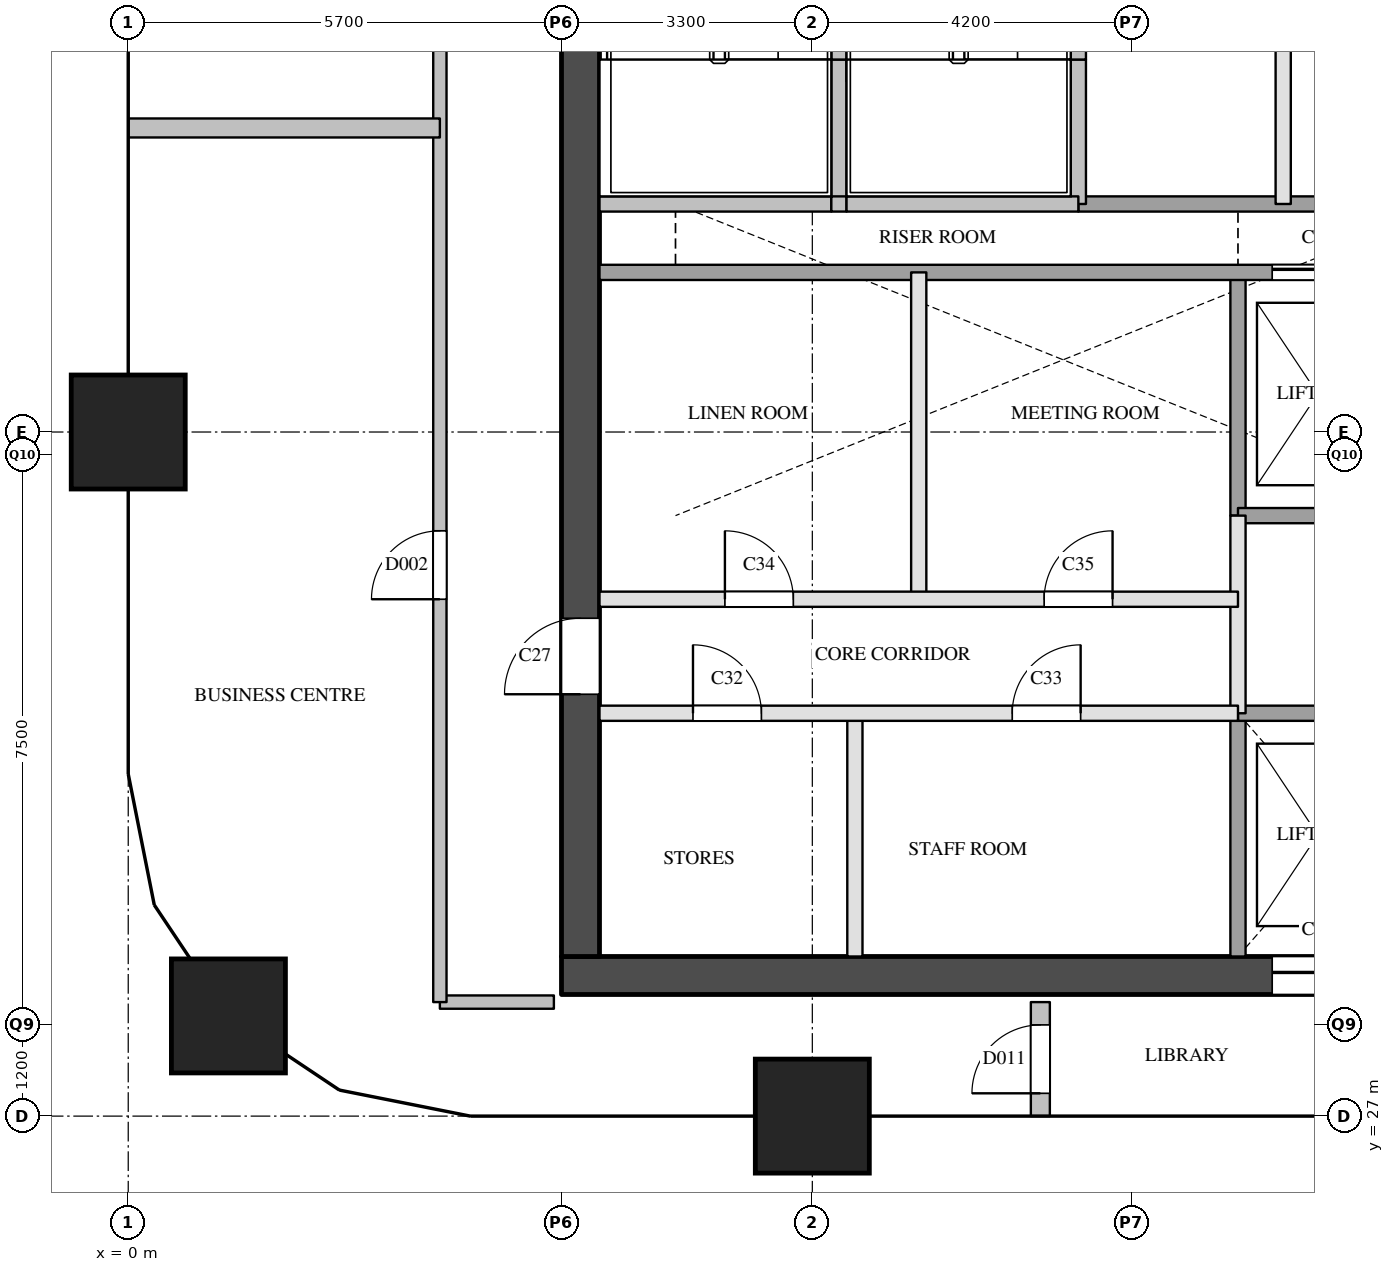
"""IFC4 building model, lengths in metres.
Left out: names, types, materials, properties, quantities, classifications, styles, units other than length and angle.
Written with IfcOpenShell. Run it as: python <this file> out.ifc"""

import sys

from ifc_helpers import new_model, si_unit, direction, frame, frame_2d, origin, origin_2d, place, context, subcontext, project, spatial, rectangle, extrude, element, fill, save


model = new_model("IFC4")
c1 = context("Model", 3, precision=1e-05, world=origin(), true_north=direction((0.0, 1.0)))
c2 = subcontext(c1, "Body", "Model", "MODEL_VIEW")
j1 = project(units=[si_unit("LENGTHUNIT", "METRE"), si_unit("PLANEANGLEUNIT", "RADIAN")], contexts=[c1])
p1 = place(None, origin())
s1 = spatial("IfcSite", under=j1, at=p1, CompositionType="ELEMENT")
p2 = place(p1, origin())
s2 = spatial("IfcBuilding", under=s1, at=p2, CompositionType="ELEMENT")
p3 = place(p2, frame((0.0, 0.0, 138.8)))
s3 = spatial("IfcBuildingStorey", under=s2, at=p3, CompositionType="ELEMENT", Elevation=138.8)
for number, where, z_axis, x_axis in (
    (1, (1.318, 28.318, 0.0), (0.0, 0.0, 1.0), (1.0, 0.0, 0.0)),
    (2, (0.0, 36.0, 0.0), (0.0, 0.0, 1.0), (1.0, 0.0, 0.0)),
    (3, (9.0, 27.0, 0.0), (0.0, 0.0, 1.0), (1.0, 0.0, 0.0)),
):
    element("IfcColumn", number, at=place(p3, frame(where, z_axis=z_axis, x_axis=x_axis)), inside=s3, PredefinedType="COLUMN", context=c2, shape_type="SweptSolid", body=[
        extrude(rectangle(XDim=1.5, YDim=1.5, at=origin_2d()), origin(), (0.0, 0.0, 1.0), 3.9),
    ])
p4 = place(p3, frame((5.7, 28.85, 0.0), z_axis=(0.0, 0.0, 1.0), x_axis=(1.0, 0.0, 0.0)))
e4 = element("IfcWall", 4, at=p4, inside=s3, PredefinedType="SHEAR", context=c2, shape_type="SweptSolid", body=[
    extrude(rectangle(XDim=12.2, YDim=0.5, at=frame_2d((6.1, 0.0))), origin(), (0.0, 0.0, 1.0), 3.6),
])
p5 = place(p4, frame((9.35, 0.0, 0.0)))
e5 = element("IfcOpeningElement", 5, at=p5, cuts=e4, PredefinedType="OPENING", context=c2, shape_type="SweptSolid", body=[
    extrude(rectangle(XDim=1.2, YDim=2.1, at=frame_2d((0.6, 1.05))), frame((0.0, 0.26, 0.0), z_axis=(0.0, -1.0, 0.0), x_axis=(1.0, 0.0, 0.0)), (0.0, 0.0, 1.0), 0.52),
])
p6 = place(p3, frame((5.95, 29.1, 0.0), z_axis=(0.0, 0.0, 1.0), x_axis=(0.0, 1.0, 0.0)))
e6 = element("IfcWall", 6, at=p6, inside=s3, PredefinedType="SHEAR", context=c2, shape_type="SweptSolid", body=[
    extrude(rectangle(XDim=20.3, YDim=0.5, at=frame_2d((10.15, 0.0))), origin(), (0.0, 0.0, 1.0), 3.6),
])
p7 = place(p6, frame((3.45, 0.0, 0.0)))
e7 = element("IfcOpeningElement", 7, at=p7, cuts=e6, PredefinedType="OPENING", context=c2, shape_type="SweptSolid", body=[
    extrude(rectangle(XDim=1.0, YDim=2.1, at=frame_2d((0.5, 1.05))), frame((0.0, 0.26, 0.0), z_axis=(0.0, -1.0, 0.0), x_axis=(1.0, 0.0, 0.0)), (0.0, 0.0, 1.0), 0.52),
])
p8 = place(p6, frame((16.4, 0.0, 0.0)))
e8 = element("IfcOpeningElement", 8, at=p8, cuts=e6, PredefinedType="OPENING", context=c2, shape_type="SweptSolid", body=[
    extrude(rectangle(XDim=1.0, YDim=2.1, at=frame_2d((0.5, 1.05))), frame((0.0, 0.26, 0.0), z_axis=(0.0, -1.0, 0.0), x_axis=(1.0, 0.0, 0.0)), (0.0, 0.0, 1.0), 0.52),
])
p9 = place(p3, frame((9.35, 39.0, 0.0), z_axis=(0.0, 0.0, 1.0), x_axis=(0.0, 1.0, 0.0)))
e9 = element("IfcWall", 9, at=p9, inside=s3, PredefinedType="SOLIDWALL", context=c2, shape_type="SweptSolid", body=[
    extrude(rectangle(XDim=1.9, YDim=0.2, at=frame_2d((0.95, 0.0))), origin(), (0.0, 0.0, 1.0), 3.6),
])
p10 = place(p3, frame((9.35, 40.9, 0.0), z_axis=(0.0, 0.0, 1.0), x_axis=(0.0, 1.0, 0.0)))
e10 = element("IfcWall", 10, at=p10, inside=s3, PredefinedType="SOLIDWALL", context=c2, shape_type="SweptSolid", body=[
    extrude(rectangle(XDim=4.3, YDim=0.2, at=frame_2d((2.15, 0.0))), origin(), (0.0, 0.0, 1.0), 3.6),
])
p11 = place(p3, frame((9.56, 29.1, 0.0), z_axis=(0.0, 0.0, 1.0), x_axis=(0.0, 1.0, 0.0)))
e11 = element("IfcWall", 11, at=p11, inside=s3, PredefinedType="PARTITIONING", context=c2, shape_type="SweptSolid", body=[
    extrude(rectangle(XDim=3.2, YDim=0.2, at=frame_2d((1.6, 0.0))), origin(), (0.0, 0.0, 1.0), 3.6),
])
p12 = place(p3, frame((10.4, 33.8, 0.0), z_axis=(0.0, 0.0, 1.0), x_axis=(0.0, 1.0, 0.0)))
e12 = element("IfcWall", 12, at=p12, inside=s3, PredefinedType="PARTITIONING", context=c2, shape_type="SweptSolid", body=[
    extrude(rectangle(XDim=4.3, YDim=0.2, at=frame_2d((2.15, 0.0))), origin(), (0.0, 0.0, 1.0), 3.6),
])
p13 = place(p3, frame((12.5, 39.0, 0.0), z_axis=(0.0, 0.0, 1.0), x_axis=(0.0, 1.0, 0.0)))
e13 = element("IfcWall", 13, at=p13, inside=s3, PredefinedType="SOLIDWALL", context=c2, shape_type="SweptSolid", body=[
    extrude(rectangle(XDim=1.9, YDim=0.2, at=frame_2d((0.95, 0.0))), origin(), (0.0, 0.0, 1.0), 3.6),
])
p14 = place(p3, frame((12.5, 40.9, 0.0), z_axis=(0.0, 0.0, 1.0), x_axis=(0.0, 1.0, 0.0)))
e14 = element("IfcWall", 14, at=p14, inside=s3, PredefinedType="SOLIDWALL", context=c2, shape_type="SweptSolid", body=[
    extrude(rectangle(XDim=4.3, YDim=0.2, at=frame_2d((2.15, 0.0))), origin(), (0.0, 0.0, 1.0), 3.6),
])
p15 = place(p3, frame((14.6, 32.3, 0.0), z_axis=(0.0, 0.0, 1.0), x_axis=(0.0, 1.0, 0.0)))
e15 = element("IfcWall", 15, at=p15, inside=s3, PredefinedType="PARTITIONING", context=c2, shape_type="SweptSolid", body=[
    extrude(rectangle(XDim=2.6, YDim=0.2, at=frame_2d((1.3, 0.0))), origin(), (0.0, 0.0, 1.0), 3.6),
])
p16 = place(p3, frame((14.6, 29.1, 0.0), z_axis=(0.0, 0.0, 1.0), x_axis=(0.0, 1.0, 0.0)))
e16 = element("IfcWall", 16, at=p16, inside=s3, PredefinedType="SOLIDWALL", context=c2, shape_type="SweptSolid", body=[
    extrude(rectangle(XDim=3.2, YDim=0.2, at=frame_2d((1.6, 0.0))), origin(), (0.0, 0.0, 1.0), 3.6),
])
p17 = place(p3, frame((14.6, 34.9, 0.0), z_axis=(0.0, 0.0, 1.0), x_axis=(0.0, 1.0, 0.0)))
e17 = element("IfcWall", 17, at=p17, inside=s3, PredefinedType="SOLIDWALL", context=c2, shape_type="SweptSolid", body=[
    extrude(rectangle(XDim=3.2, YDim=0.2, at=frame_2d((1.6, 0.0))), origin(), (0.0, 0.0, 1.0), 3.6),
])
p18 = place(p3, frame((15.195, 39.0, 0.0), z_axis=(0.0, 0.0, 1.0), x_axis=(0.0, 1.0, 0.0)))
e18 = element("IfcWall", 18, at=p18, inside=s3, PredefinedType="PARTITIONING", context=c2, shape_type="SweptSolid", body=[
    extrude(rectangle(XDim=6.2, YDim=0.2, at=frame_2d((3.1, 0.0))), origin(), (0.0, 0.0, 1.0), 3.6),
])
p19 = place(p3, frame((6.2, 32.3, 0.0), z_axis=(0.0, 0.0, 1.0), x_axis=(1.0, 0.0, 0.0)))
e19 = element("IfcWall", 19, at=p19, inside=s3, PredefinedType="PARTITIONING", context=c2, shape_type="SweptSolid", body=[
    extrude(rectangle(XDim=8.4, YDim=0.2, at=frame_2d((4.2, 0.0))), origin(), (0.0, 0.0, 1.0), 3.6),
])
p20 = place(p19, frame((1.23, 0.0, 0.0)))
e20 = element("IfcOpeningElement", 20, at=p20, cuts=e19, PredefinedType="OPENING", context=c2, shape_type="SweptSolid", body=[
    extrude(rectangle(XDim=0.9, YDim=2.1, at=frame_2d((0.45, 1.05))), frame((0.0, 0.11, 0.0), z_axis=(0.0, -1.0, 0.0), x_axis=(1.0, 0.0, 0.0)), (0.0, 0.0, 1.0), 0.22),
])
p21 = place(p19, frame((5.43, 0.0, 0.0)))
e21 = element("IfcOpeningElement", 21, at=p21, cuts=e19, PredefinedType="OPENING", context=c2, shape_type="SweptSolid", body=[
    extrude(rectangle(XDim=0.9, YDim=2.1, at=frame_2d((0.45, 1.05))), frame((0.0, 0.11, 0.0), z_axis=(0.0, -1.0, 0.0), x_axis=(1.0, 0.0, 0.0)), (0.0, 0.0, 1.0), 0.22),
])
p22 = place(p3, frame((14.6, 32.3, 0.0), z_axis=(0.0, 0.0, 1.0), x_axis=(1.0, 0.0, 0.0)))
e22 = element("IfcWall", 22, at=p22, inside=s3, PredefinedType="SOLIDWALL", context=c2, shape_type="SweptSolid", body=[
    extrude(rectangle(XDim=2.8, YDim=0.2, at=frame_2d((1.4, 0.0))), origin(), (0.0, 0.0, 1.0), 3.6),
])
p23 = place(p3, frame((6.2, 33.8, 0.0), z_axis=(0.0, 0.0, 1.0), x_axis=(1.0, 0.0, 0.0)))
e23 = element("IfcWall", 23, at=p23, inside=s3, PredefinedType="PARTITIONING", context=c2, shape_type="SweptSolid", body=[
    extrude(rectangle(XDim=8.4, YDim=0.2, at=frame_2d((4.2, 0.0))), origin(), (0.0, 0.0, 1.0), 3.6),
])
p24 = place(p23, frame((1.65, 0.0, 0.0)))
e24 = element("IfcOpeningElement", 24, at=p24, cuts=e23, PredefinedType="OPENING", context=c2, shape_type="SweptSolid", body=[
    extrude(rectangle(XDim=0.9, YDim=2.1, at=frame_2d((0.45, 1.05))), frame((0.0, 0.11, 0.0), z_axis=(0.0, -1.0, 0.0), x_axis=(1.0, 0.0, 0.0)), (0.0, 0.0, 1.0), 0.22),
])
p25 = place(p23, frame((5.85, 0.0, 0.0)))
e25 = element("IfcOpeningElement", 25, at=p25, cuts=e23, PredefinedType="OPENING", context=c2, shape_type="SweptSolid", body=[
    extrude(rectangle(XDim=0.9, YDim=2.1, at=frame_2d((0.45, 1.05))), frame((0.0, 0.11, 0.0), z_axis=(0.0, -1.0, 0.0), x_axis=(1.0, 0.0, 0.0)), (0.0, 0.0, 1.0), 0.22),
])
p26 = place(p3, frame((14.6, 34.9, 0.0), z_axis=(0.0, 0.0, 1.0), x_axis=(1.0, 0.0, 0.0)))
e26 = element("IfcWall", 26, at=p26, inside=s3, PredefinedType="SOLIDWALL", context=c2, shape_type="SweptSolid", body=[
    extrude(rectangle(XDim=2.8, YDim=0.2, at=frame_2d((1.4, 0.0))), origin(), (0.0, 0.0, 1.0), 3.6),
])
p27 = place(p3, frame((6.2, 38.1, 0.0), z_axis=(0.0, 0.0, 1.0), x_axis=(1.0, 0.0, 0.0)))
e27 = element("IfcWall", 27, at=p27, inside=s3, PredefinedType="SOLIDWALL", context=c2, shape_type="SweptSolid", body=[
    extrude(rectangle(XDim=11.2, YDim=0.2, at=frame_2d((5.6, 0.0))), origin(), (0.0, 0.0, 1.0), 3.6),
])
p28 = place(p27, frame((8.85, 0.0, 0.0)))
e28 = element("IfcOpeningElement", 28, at=p28, cuts=e27, PredefinedType="OPENING", context=c2, shape_type="SweptSolid", body=[
    extrude(rectangle(XDim=1.2, YDim=2.1, at=frame_2d((0.6, 1.05))), frame((0.0, 0.11, 0.0), z_axis=(0.0, -1.0, 0.0), x_axis=(1.0, 0.0, 0.0)), (0.0, 0.0, 1.0), 0.22),
])
p29 = place(p3, frame((12.5, 39.0, 0.0), z_axis=(0.0, 0.0, 1.0), x_axis=(1.0, 0.0, 0.0)))
e29 = element("IfcWall", 29, at=p29, inside=s3, PredefinedType="SOLIDWALL", context=c2, shape_type="SweptSolid", body=[
    extrude(rectangle(XDim=4.9, YDim=0.2, at=frame_2d((2.45, 0.0))), origin(), (0.0, 0.0, 1.0), 3.6),
])
p30 = place(p3, frame((6.2, 39.0, 0.0), z_axis=(0.0, 0.0, 1.0), x_axis=(1.0, 0.0, 0.0)))
e30 = element("IfcWall", 30, at=p30, inside=s3, PredefinedType="SOLIDWALL", context=c2, shape_type="SweptSolid", body=[
    extrude(rectangle(XDim=3.05, YDim=0.2, at=frame_2d((1.525, 0.0))), origin(), (0.0, 0.0, 1.0), 3.6),
])
p31 = place(p3, frame((9.25, 39.0, 0.0), z_axis=(0.0, 0.0, 1.0), x_axis=(1.0, 0.0, 0.0)))
e31 = element("IfcWall", 31, at=p31, inside=s3, PredefinedType="SOLIDWALL", context=c2, shape_type="SweptSolid", body=[
    extrude(rectangle(XDim=0.2, YDim=0.2, at=frame_2d((0.1, 0.0))), origin(), (0.0, 0.0, 1.0), 3.6),
])
p32 = place(p3, frame((9.45, 39.0, 0.0), z_axis=(0.0, 0.0, 1.0), x_axis=(1.0, 0.0, 0.0)))
e32 = element("IfcWall", 32, at=p32, inside=s3, PredefinedType="SOLIDWALL", context=c2, shape_type="SweptSolid", body=[
    extrude(rectangle(XDim=3.05, YDim=0.2, at=frame_2d((1.525, 0.0))), origin(), (0.0, 0.0, 1.0), 3.6),
])
p33 = place(p3, frame((4.1, 28.5, 0.0), z_axis=(0.0, 0.0, 1.0), x_axis=(1.0, 0.0, 0.0)))
e33 = element("IfcWall", 33, at=p33, inside=s3, PredefinedType="PARTITIONING", context=c2, shape_type="SweptSolid", body=[
    extrude(rectangle(XDim=1.5, YDim=0.175, at=frame_2d((0.75, 0.0))), origin(), (0.0, 0.0, 1.0), 3.6),
])
p34 = place(p3, frame((4.1, 28.5, 0.0), z_axis=(0.0, 0.0, 1.0), x_axis=(0.0, 1.0, 0.0)))
e34 = element("IfcWall", 34, at=p34, inside=s3, PredefinedType="PARTITIONING", context=c2, shape_type="SweptSolid", body=[
    extrude(rectangle(XDim=23.0, YDim=0.175, at=frame_2d((11.5, 0.0))), origin(), (0.0, 0.0, 1.0), 3.6),
])
p35 = place(p34, frame((5.3, 0.0, 0.0)))
e35 = element("IfcOpeningElement", 35, at=p35, cuts=e34, PredefinedType="OPENING", context=c2, shape_type="SweptSolid", body=[
    extrude(rectangle(XDim=0.9, YDim=2.1, at=frame_2d((0.45, 1.05))), frame((0.0, 0.097, 0.0), z_axis=(0.0, -1.0, 0.0), x_axis=(1.0, 0.0, 0.0)), (0.0, 0.0, 1.0), 0.195),
])
p36 = place(p34, frame((16.8, 0.0, 0.0)))
e36 = element("IfcOpeningElement", 36, at=p36, cuts=e34, PredefinedType="OPENING", context=c2, shape_type="SweptSolid", body=[
    extrude(rectangle(XDim=0.9, YDim=2.1, at=frame_2d((0.45, 1.05))), frame((0.0, 0.097, 0.0), z_axis=(0.0, -1.0, 0.0), x_axis=(1.0, 0.0, 0.0)), (0.0, 0.0, 1.0), 0.195),
])
p37 = place(p3, frame((0.0, 40.0, 0.0), z_axis=(0.0, 0.0, 1.0), x_axis=(1.0, 0.0, 0.0)))
e37 = element("IfcWall", 37, at=p37, inside=s3, PredefinedType="PARTITIONING", context=c2, shape_type="SweptSolid", body=[
    extrude(rectangle(XDim=4.1, YDim=0.25, at=frame_2d((2.05, 0.0))), origin(), (0.0, 0.0, 1.0), 2.6),
])
p38 = place(p3, frame((12.0, 27.0, 0.0), z_axis=(0.0, 0.0, 1.0), x_axis=(0.0, 1.0, 0.0)))
e38 = element("IfcWall", 38, at=p38, inside=s3, PredefinedType="PARTITIONING", context=c2, shape_type="SweptSolid", body=[
    extrude(rectangle(XDim=1.5, YDim=0.25, at=frame_2d((0.75, 0.0))), origin(), (0.0, 0.0, 1.0), 2.6),
])
p39 = place(p38, frame((0.3, 0.0, 0.0)))
e39 = element("IfcOpeningElement", 39, at=p39, cuts=e38, PredefinedType="OPENING", context=c2, shape_type="SweptSolid", body=[
    extrude(rectangle(XDim=0.9, YDim=2.1, at=frame_2d((0.45, 1.05))), frame((0.0, 0.135, 0.0), z_axis=(0.0, -1.0, 0.0), x_axis=(1.0, 0.0, 0.0)), (0.0, 0.0, 1.0), 0.27),
])
p40 = place(p5, origin())
e40 = element("IfcDoor", 40, at=p40, inside=s3, OperationType="SLIDING_TO_LEFT", PredefinedType="DOOR", context=c2, shape_type="SweptSolid", body=[
    extrude(rectangle(XDim=1.2, YDim=2.1, at=frame_2d((0.6, 1.05))), frame((0.0, 0.025, 0.0), z_axis=(0.0, -1.0, 0.0), x_axis=(1.0, 0.0, 0.0)), (0.0, 0.0, 1.0), 0.05),
])
fill(e5, e40)
p41 = place(p28, origin())
e41 = element("IfcDoor", 41, at=p41, inside=s3, OperationType="SLIDING_TO_LEFT", PredefinedType="DOOR", context=c2, shape_type="SweptSolid", body=[
    extrude(rectangle(XDim=1.2, YDim=2.1, at=frame_2d((0.6, 1.05))), frame((0.0, 0.025, 0.0), z_axis=(0.0, -1.0, 0.0), x_axis=(1.0, 0.0, 0.0)), (0.0, 0.0, 1.0), 0.05),
])
fill(e28, e41)
p42 = place(p7, origin())
e42 = element("IfcDoor", 42, at=p42, inside=s3, OperationType="SINGLE_SWING_LEFT", PredefinedType="DOOR", context=c2, shape_type="SweptSolid", body=[
    extrude(rectangle(XDim=1.0, YDim=2.1, at=frame_2d((0.5, 1.05))), frame((0.0, 0.025, 0.0), z_axis=(0.0, -1.0, 0.0), x_axis=(1.0, 0.0, 0.0)), (0.0, 0.0, 1.0), 0.05),
])
fill(e7, e42)
p43 = place(p20, origin())
e43 = element("IfcDoor", 43, at=p43, inside=s3, OperationType="SINGLE_SWING_LEFT", PredefinedType="DOOR", context=c2, shape_type="SweptSolid", body=[
    extrude(rectangle(XDim=0.9, YDim=2.1, at=frame_2d((0.45, 1.05))), frame((0.0, 0.025, 0.0), z_axis=(0.0, -1.0, 0.0), x_axis=(1.0, 0.0, 0.0)), (0.0, 0.0, 1.0), 0.05),
])
fill(e20, e43)
p44 = place(p21, origin())
e44 = element("IfcDoor", 44, at=p44, inside=s3, OperationType="SINGLE_SWING_RIGHT", PredefinedType="DOOR", context=c2, shape_type="SweptSolid", body=[
    extrude(rectangle(XDim=0.9, YDim=2.1, at=frame_2d((0.45, 1.05))), frame((0.0, 0.025, 0.0), z_axis=(0.0, -1.0, 0.0), x_axis=(1.0, 0.0, 0.0)), (0.0, 0.0, 1.0), 0.05),
])
fill(e21, e44)
p45 = place(p24, origin())
e45 = element("IfcDoor", 45, at=p45, inside=s3, OperationType="SINGLE_SWING_LEFT", PredefinedType="DOOR", context=c2, shape_type="SweptSolid", body=[
    extrude(rectangle(XDim=0.9, YDim=2.1, at=frame_2d((0.45, 1.05))), frame((0.0, 0.025, 0.0), z_axis=(0.0, -1.0, 0.0), x_axis=(1.0, 0.0, 0.0)), (0.0, 0.0, 1.0), 0.05),
])
fill(e24, e45)
p46 = place(p25, origin())
e46 = element("IfcDoor", 46, at=p46, inside=s3, OperationType="SINGLE_SWING_RIGHT", PredefinedType="DOOR", context=c2, shape_type="SweptSolid", body=[
    extrude(rectangle(XDim=0.9, YDim=2.1, at=frame_2d((0.45, 1.05))), frame((0.0, 0.025, 0.0), z_axis=(0.0, -1.0, 0.0), x_axis=(1.0, 0.0, 0.0)), (0.0, 0.0, 1.0), 0.05),
])
fill(e25, e46)
p47 = place(p35, origin())
e47 = element("IfcDoor", 47, at=p47, inside=s3, OperationType="SINGLE_SWING_LEFT", PredefinedType="DOOR", context=c2, shape_type="SweptSolid", body=[
    extrude(rectangle(XDim=0.9, YDim=2.1, at=frame_2d((0.45, 1.05))), frame((0.0, 0.025, 0.0), z_axis=(0.0, -1.0, 0.0), x_axis=(1.0, 0.0, 0.0)), (0.0, 0.0, 1.0), 0.05),
])
fill(e35, e47)
p48 = place(p39, origin())
e48 = element("IfcDoor", 48, at=p48, inside=s3, OperationType="SINGLE_SWING_LEFT", PredefinedType="DOOR", context=c2, shape_type="SweptSolid", body=[
    extrude(rectangle(XDim=0.9, YDim=2.1, at=frame_2d((0.45, 1.05))), frame((0.0, 0.025, 0.0), z_axis=(0.0, -1.0, 0.0), x_axis=(1.0, 0.0, 0.0)), (0.0, 0.0, 1.0), 0.05),
])
fill(e39, e48)
save(model, sys.argv[1])
